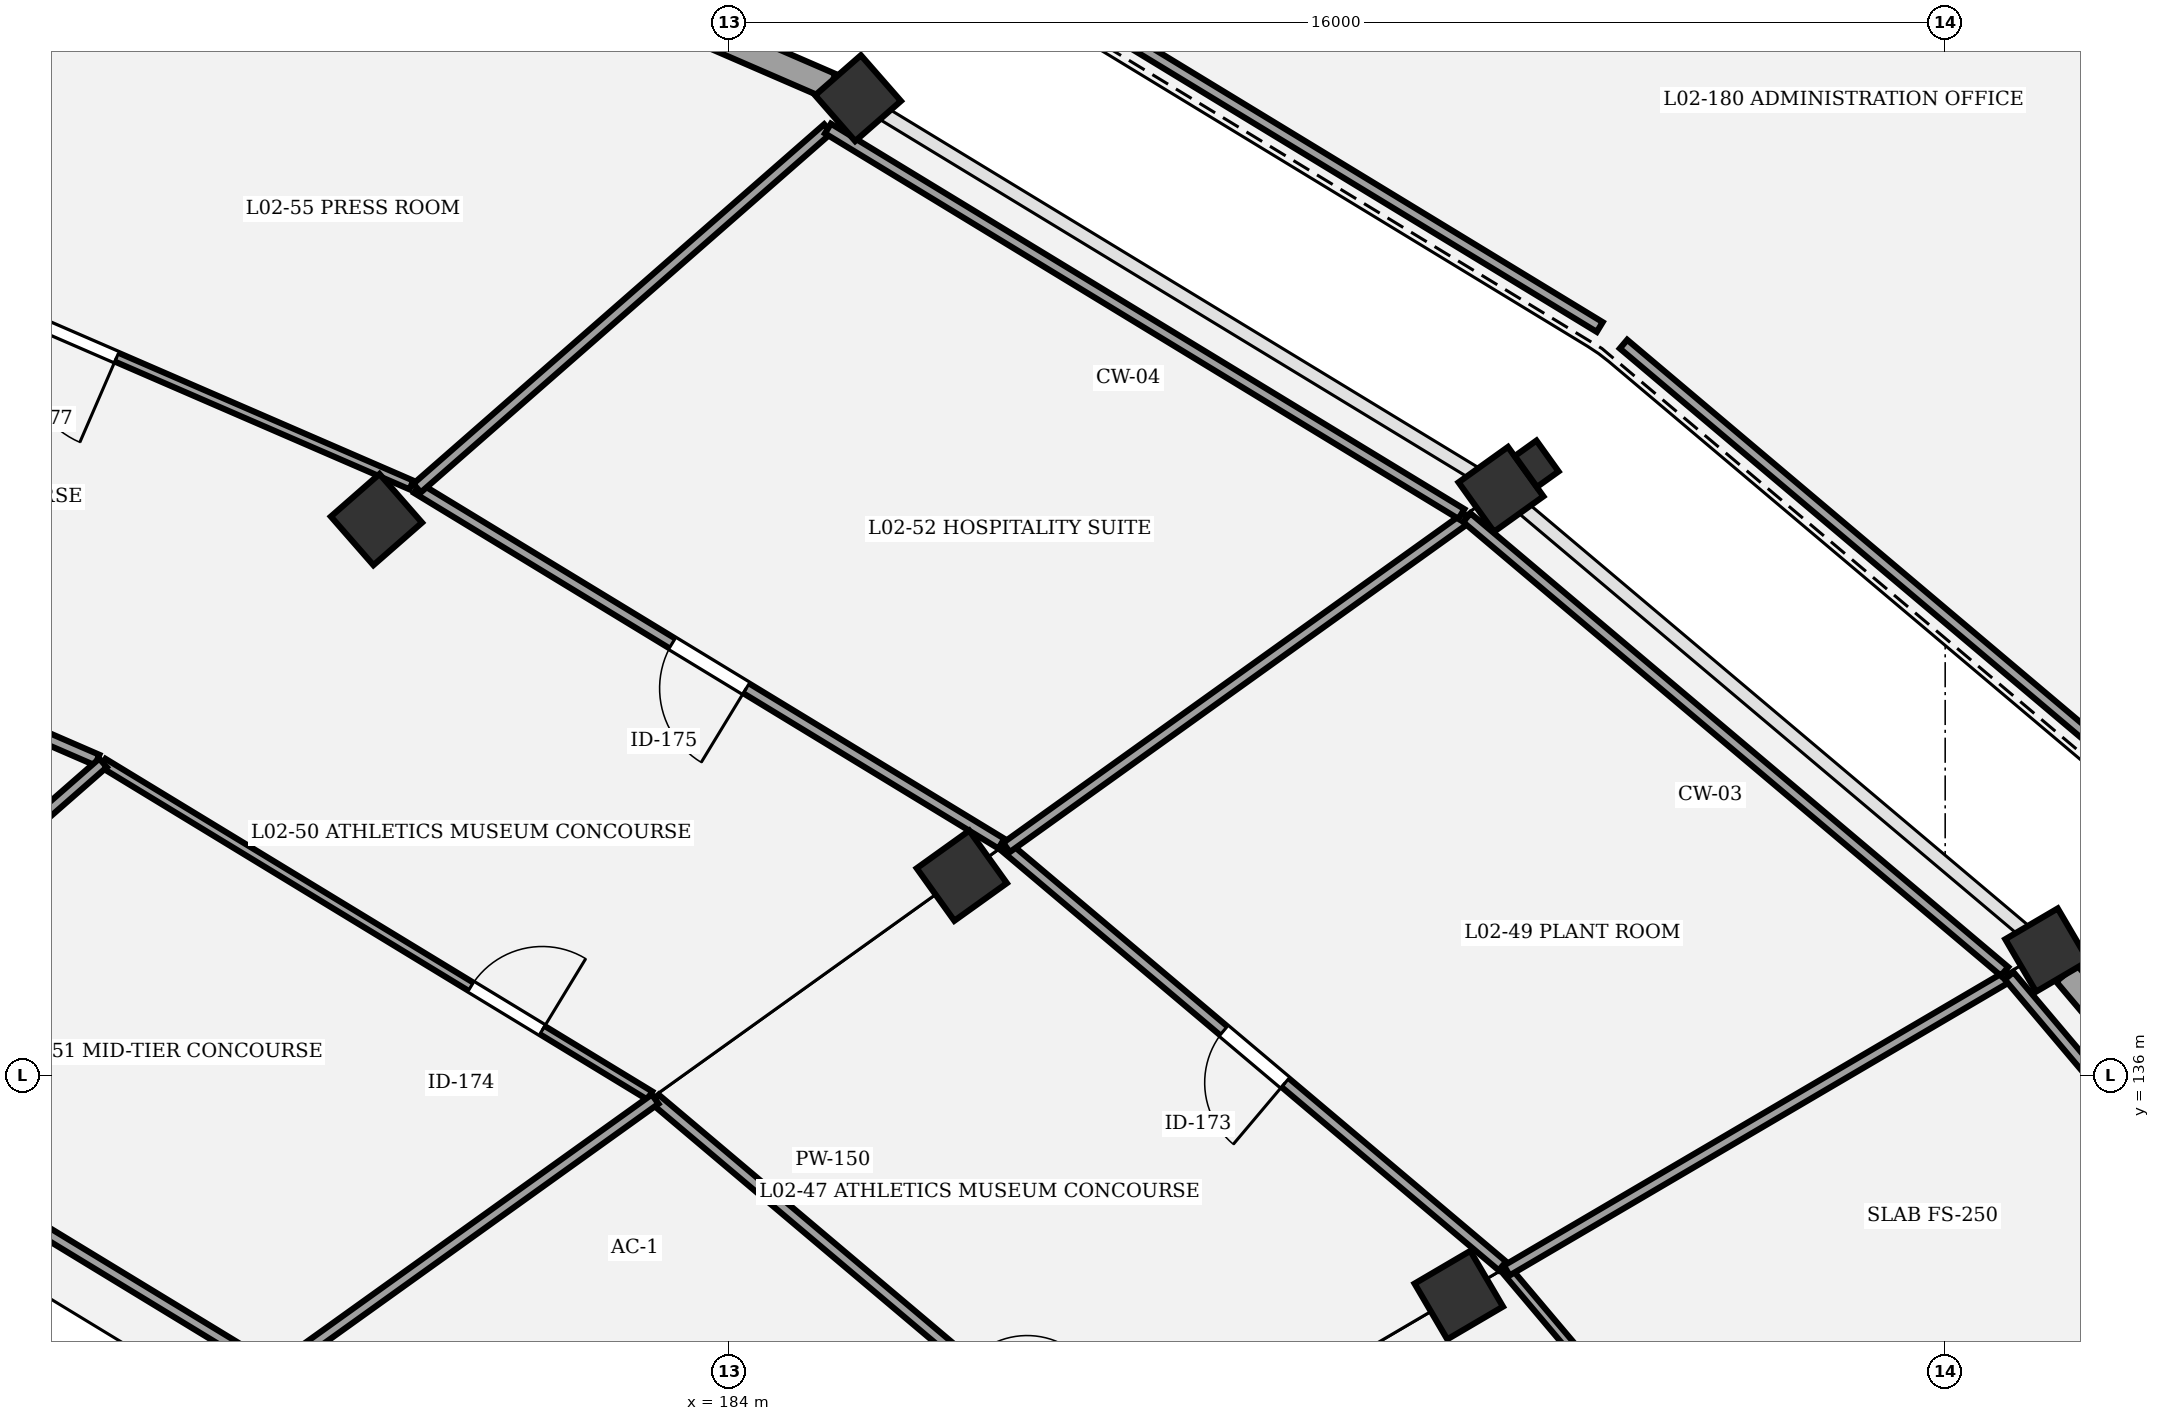
"""IFC4 building model, lengths in metres.
Left out: names, types, materials, properties, quantities, classifications, styles, units other than length and angle.
Written with IfcOpenShell. Run it as: python <this file> out.ifc"""

import sys

from ifc_helpers import new_model, si_unit, direction, frame, frame_2d, origin, origin_2d, place, context, subcontext, project, spatial, rectangle, extrude, element, fill, save


model = new_model("IFC4")
c1 = context("Model", 3, precision=1e-05, world=origin(), true_north=direction((0.0, 1.0)))
c2 = subcontext(c1, "Body", "Model", "MODEL_VIEW")
j1 = project(units=[si_unit("LENGTHUNIT", "METRE"), si_unit("PLANEANGLEUNIT", "RADIAN")], contexts=[c1])
p1 = place(None, origin())
s1 = spatial("IfcSite", under=j1, at=p1, CompositionType="ELEMENT")
p2 = place(p1, origin())
s2 = spatial("IfcBuilding", under=s1, at=p2, CompositionType="ELEMENT")
p3 = place(p2, frame((0.0, 0.0, 10.2)))
s3 = spatial("IfcBuildingStorey", under=s2, at=p3, CompositionType="ELEMENT", Elevation=10.2)
p4 = place(p3, frame((193.6, 133.114, 0.0), z_axis=(0.0, 0.0, 1.0), x_axis=(0.862513669207, 0.506033764121, 0.0)))
e1 = element("IfcColumn", 1, at=p4, inside=s3, PredefinedType="COLUMN", context=c2, shape_type="SweptSolid", body=[
    extrude(rectangle(XDim=0.85, YDim=0.85, at=origin_2d()), origin(), (0.0, 0.0, 1.0), 4.5),
])
p5 = place(p3, frame((201.338, 137.654, 0.0), z_axis=(0.0, 0.0, 1.0), x_axis=(0.862513669207, 0.506033764121, 0.0)))
e2 = element("IfcColumn", 2, at=p5, inside=s3, PredefinedType="COLUMN", context=c2, shape_type="SweptSolid", body=[
    extrude(rectangle(XDim=0.8, YDim=0.8, at=origin_2d()), origin(), (0.0, 0.0, 1.0), 4.5),
])
p6 = place(p3, frame((187.061, 138.632, 0.0), z_axis=(0.0, 0.0, 1.0), x_axis=(0.812897512265, 0.582406760395, 0.0)))
e3 = element("IfcColumn", 3, at=p6, inside=s3, PredefinedType="COLUMN", context=c2, shape_type="SweptSolid", body=[
    extrude(rectangle(XDim=0.85, YDim=0.85, at=origin_2d()), origin(), (0.0, 0.0, 1.0), 4.5),
])
p7 = place(p3, frame((194.156, 143.715, 0.0), z_axis=(0.0, 0.0, 1.0), x_axis=(0.812897512265, 0.582406760395, 0.0)))
e4 = element("IfcColumn", 4, at=p7, inside=s3, PredefinedType="COLUMN", context=c2, shape_type="SweptSolid", body=[
    extrude(rectangle(XDim=0.8, YDim=0.8, at=origin_2d()), origin(), (0.0, 0.0, 1.0), 4.5),
])
p8 = place(p3, frame((194.625, 144.051, 0.0), z_axis=(0.0, 0.0, 1.0), x_axis=(-0.582406760395, 0.812897512265, 0.0)))
e5 = element("IfcColumn", 5, at=p8, inside=s3, PredefinedType="PILASTER", context=c2, shape_type="SweptSolid", body=[
    extrude(rectangle(XDim=0.5, YDim=0.35, at=origin_2d()), origin(), (0.0, 0.0, 1.0), 4.5),
])
p9 = place(p3, frame((179.36, 143.317, 0.0), z_axis=(0.0, 0.0, 1.0), x_axis=(0.752529860433, 0.658558128912, 0.0)))
e6 = element("IfcColumn", 6, at=p9, inside=s3, PredefinedType="COLUMN", context=c2, shape_type="SweptSolid", body=[
    extrude(rectangle(XDim=0.85, YDim=0.85, at=origin_2d()), origin(), (0.0, 0.0, 1.0), 4.5),
])
p10 = place(p3, frame((185.696, 148.861, 0.0), z_axis=(0.0, 0.0, 1.0), x_axis=(0.752529860433, 0.658558128912, 0.0)))
e7 = element("IfcColumn", 7, at=p10, inside=s3, PredefinedType="COLUMN", context=c2, shape_type="SweptSolid", body=[
    extrude(rectangle(XDim=0.8, YDim=0.8, at=origin_2d()), origin(), (0.0, 0.0, 1.0), 4.5),
])
p11 = place(p3, frame((206.986, 130.966, 0.0), z_axis=(0.0, 0.0, 1.0), x_axis=(-0.64515466323, 0.764052001184, 0.0)))
e8 = element("IfcWall", 8, at=p11, inside=s3, PredefinedType="STANDARD", context=c2, shape_type="SweptSolid", body=[
    extrude(rectangle(XDim=8.355, YDim=0.35, at=frame_2d((4.178, 0.0))), origin(), (0.0, 0.0, 1.0), 3.42),
])
p12 = place(p11, frame((2.918, 0.0, 0.9)))
e9 = element("IfcOpeningElement", 9, at=p12, cuts=e8, PredefinedType="OPENING", context=c2, shape_type="SweptSolid", body=[
    extrude(rectangle(XDim=2.52, YDim=1.75, at=frame_2d((1.26, 0.875))), frame((0.0, 0.185, 0.0), z_axis=(0.0, -1.0, 0.0), x_axis=(1.0, 0.0, 0.0)), (0.0, 0.0, 1.0), 0.37),
])
p13 = place(p3, frame((176.303, 152.933, 0.0), z_axis=(0.0, 0.0, 1.0), x_axis=(0.917498288986, -0.397739726088, 0.0)))
e10 = element("IfcWall", 10, at=p13, inside=s3, PredefinedType="STANDARD", context=c2, shape_type="SweptSolid", body=[
    extrude(rectangle(XDim=9.84, YDim=0.35, at=frame_2d((4.92, 0.0))), origin(), (0.0, 0.0, 1.0), 3.42),
])
p14 = place(p13, frame((4.02, 0.0, 0.0)))
e11 = element("IfcOpeningElement", 11, at=p14, cuts=e10, PredefinedType="OPENING", context=c2, shape_type="SweptSolid", body=[
    extrude(rectangle(XDim=1.8, YDim=2.4, at=frame_2d((0.9, 1.2))), frame((0.0, 0.185, 0.0), z_axis=(0.0, -1.0, 0.0), x_axis=(1.0, 0.0, 0.0)), (0.0, 0.0, 1.0), 0.37),
])
p15 = place(p3, frame((199.595, 127.086, 0.0), z_axis=(0.0, 0.0, 1.0), x_axis=(-0.64516519871, 0.76404310505, 0.0)))
e12 = element("IfcWall", 12, at=p15, inside=s3, PredefinedType="PARTITIONING", context=c2, shape_type="SweptSolid", body=[
    extrude(rectangle(XDim=8.313, YDim=0.125, at=frame_2d((4.157, 0.0))), origin(), (0.0, 0.0, 1.0), 3.25),
])
p16 = place(p15, frame((3.667, 0.0, 0.0)))
e13 = element("IfcOpeningElement", 13, at=p16, cuts=e12, PredefinedType="OPENING", context=c2, shape_type="SweptSolid", body=[
    extrude(rectangle(XDim=0.98, YDim=2.3, at=frame_2d((0.49, 1.15))), frame((0.0, 0.073, 0.0), z_axis=(0.0, -1.0, 0.0), x_axis=(1.0, 0.0, 0.0)), (0.0, 0.0, 1.0), 0.145),
])
p17 = place(p3, frame((183.027, 135.692, 0.0), z_axis=(0.0, 0.0, 1.0), x_axis=(0.764249122867, -0.644921141068, 0.0)))
e14 = element("IfcWall", 14, at=p17, inside=s3, PredefinedType="PARTITIONING", context=c2, shape_type="SweptSolid", body=[
    extrude(rectangle(XDim=7.99, YDim=0.15, at=frame_2d((3.995, 0.0))), origin(), (0.0, 0.0, 1.0), 3.25),
])
p18 = place(p17, frame((5.384, 0.0, 0.0)))
e15 = element("IfcOpeningElement", 15, at=p18, cuts=e14, PredefinedType="OPENING", context=c2, shape_type="SweptSolid", body=[
    extrude(rectangle(XDim=1.02, YDim=2.3, at=frame_2d((0.51, 1.15))), frame((0.0, 0.085, 0.0), z_axis=(0.0, -1.0, 0.0), x_axis=(1.0, 0.0, 0.0)), (0.0, 0.0, 1.0), 0.17),
])
p19 = place(p3, frame((194.175, 133.497, 0.0), z_axis=(0.0, 0.0, 1.0), x_axis=(-0.764257572309, 0.644911128117, 0.0)))
e16 = element("IfcWall", 16, at=p19, inside=s3, PredefinedType="PARTITIONING", context=c2, shape_type="SweptSolid", body=[
    extrude(rectangle(XDim=8.539, YDim=0.15, at=frame_2d((4.269, 0.0))), origin(), (0.0, 0.0, 1.0), 3.25),
])
p20 = place(p19, frame((3.739, 0.0, 0.0)))
e17 = element("IfcOpeningElement", 17, at=p20, cuts=e16, PredefinedType="OPENING", context=c2, shape_type="SweptSolid", body=[
    extrude(rectangle(XDim=1.06, YDim=2.3, at=frame_2d((0.53, 1.15))), frame((0.0, 0.085, 0.0), z_axis=(0.0, -1.0, 0.0), x_axis=(1.0, 0.0, 0.0)), (0.0, 0.0, 1.0), 0.17),
])
p21 = place(p3, frame((175.763, 140.116, 0.0), z_axis=(0.0, 0.0, 1.0), x_axis=(0.854330104408, -0.519730769439, 0.0)))
e18 = element("IfcWall", 18, at=p21, inside=s3, PredefinedType="PARTITIONING", context=c2, shape_type="SweptSolid", body=[
    extrude(rectangle(XDim=8.42, YDim=0.125, at=frame_2d((4.21, 0.0))), origin(), (0.0, 0.0, 1.0), 3.25),
])
p22 = place(p21, frame((5.664, 0.0, 0.0)))
e19 = element("IfcOpeningElement", 19, at=p22, cuts=e18, PredefinedType="OPENING", context=c2, shape_type="SweptSolid", body=[
    extrude(rectangle(XDim=1.1, YDim=2.3, at=frame_2d((0.55, 1.15))), frame((0.0, 0.073, 0.0), z_axis=(0.0, -1.0, 0.0), x_axis=(1.0, 0.0, 0.0)), (0.0, 0.0, 1.0), 0.145),
])
p23 = place(p3, frame((187.582, 139.054, 0.0), z_axis=(0.0, 0.0, 1.0), x_axis=(-0.854321649351, 0.519744667554, 0.0)))
e20 = element("IfcWall", 20, at=p23, inside=s3, PredefinedType="PARTITIONING", context=c2, shape_type="SweptSolid", body=[
    extrude(rectangle(XDim=8.999, YDim=0.15, at=frame_2d((4.499, 0.0))), origin(), (0.0, 0.0, 1.0), 3.25),
])
p24 = place(p23, frame((3.929, 0.0, 0.0)))
e21 = element("IfcOpeningElement", 21, at=p24, cuts=e20, PredefinedType="OPENING", context=c2, shape_type="SweptSolid", body=[
    extrude(rectangle(XDim=1.14, YDim=2.3, at=frame_2d((0.57, 1.15))), frame((0.0, 0.085, 0.0), z_axis=(0.0, -1.0, 0.0), x_axis=(1.0, 0.0, 0.0)), (0.0, 0.0, 1.0), 0.17),
])
p25 = place(p3, frame((167.382, 143.753, 0.0), z_axis=(0.0, 0.0, 1.0), x_axis=(0.917494590455, -0.397748257677, 0.0)))
e22 = element("IfcWall", 22, at=p25, inside=s3, PredefinedType="PARTITIONING", context=c2, shape_type="SweptSolid", body=[
    extrude(rectangle(XDim=9.049, YDim=0.15, at=frame_2d((4.525, 0.0))), origin(), (0.0, 0.0, 1.0), 3.25),
])
p26 = place(p25, frame((6.104, 0.0, 0.0)))
e23 = element("IfcOpeningElement", 23, at=p26, cuts=e22, PredefinedType="OPENING", context=c2, shape_type="SweptSolid", body=[
    extrude(rectangle(XDim=1.18, YDim=2.3, at=frame_2d((0.59, 1.15))), frame((0.0, 0.085, 0.0), z_axis=(0.0, -1.0, 0.0), x_axis=(1.0, 0.0, 0.0)), (0.0, 0.0, 1.0), 0.17),
])
p27 = place(p3, frame((179.82, 143.772, 0.0), z_axis=(0.0, 0.0, 1.0), x_axis=(-0.917508957037, 0.39771511633, 0.0)))
e24 = element("IfcWall", 24, at=p27, inside=s3, PredefinedType="PARTITIONING", context=c2, shape_type="SweptSolid", body=[
    extrude(rectangle(XDim=9.671, YDim=0.125, at=frame_2d((4.836, 0.0))), origin(), (0.0, 0.0, 1.0), 3.25),
])
p28 = place(p27, frame((4.226, 0.0, 0.0)))
e25 = element("IfcOpeningElement", 25, at=p28, cuts=e24, PredefinedType="OPENING", context=c2, shape_type="SweptSolid", body=[
    extrude(rectangle(XDim=1.22, YDim=2.3, at=frame_2d((0.61, 1.15))), frame((0.0, 0.073, 0.0), z_axis=(0.0, -1.0, 0.0), x_axis=(1.0, 0.0, 0.0)), (0.0, 0.0, 1.0), 0.145),
])
p29 = place(p3, frame((194.232, 133.438, 0.0), z_axis=(0.0, 0.0, 1.0), x_axis=(0.862520085009, 0.506022828492, 0.0)))
e26 = element("IfcWall", 26, at=p29, inside=s3, PredefinedType="PARTITIONING", context=c2, shape_type="SweptSolid", body=[
    extrude(rectangle(XDim=7.663, YDim=0.15, at=frame_2d((3.831, 0.0))), origin(), (0.0, 0.0, 1.0), 3.25),
])
p30 = place(p3, frame((200.841, 137.315, 0.0), z_axis=(0.0, 0.0, 1.0), x_axis=(0.645166061073, -0.764042376861, 0.0)))
e27 = element("IfcWall", 27, at=p30, inside=s3, PredefinedType="PARTITIONING", context=c2, shape_type="SweptSolid", body=[
    extrude(rectangle(XDim=9.014, YDim=0.15, at=frame_2d((4.507, 0.0))), origin(), (0.0, 0.0, 1.0), 3.25),
])
p31 = place(p3, frame((178.016, 132.102, 0.0), z_axis=(0.0, 0.0, 1.0), x_axis=(0.812884316969, 0.582425177362, 0.0)))
e28 = element("IfcWall", 28, at=p31, inside=s3, PredefinedType="PARTITIONING", context=c2, shape_type="SweptSolid", body=[
    extrude(rectangle(XDim=6.165, YDim=0.15, at=frame_2d((3.082, 0.0))), origin(), (0.0, 0.0, 1.0), 3.25),
])
p32 = place(p3, frame((187.649, 139.004, 0.0), z_axis=(0.0, 0.0, 1.0), x_axis=(0.812884613266, 0.582424763824, 0.0)))
e29 = element("IfcWall", 29, at=p32, inside=s3, PredefinedType="PARTITIONING", context=c2, shape_type="SweptSolid", body=[
    extrude(rectangle(XDim=7.45, YDim=0.15, at=frame_2d((3.725, 0.0))), origin(), (0.0, 0.0, 1.0), 3.25),
])
p33 = place(p3, frame((193.706, 143.343, 0.0), z_axis=(0.0, 0.0, 1.0), x_axis=(0.764252893528, -0.644916672706, 0.0)))
e30 = element("IfcWall", 30, at=p33, inside=s3, PredefinedType="PARTITIONING", context=c2, shape_type="SweptSolid", body=[
    extrude(rectangle(XDim=9.257, YDim=0.15, at=frame_2d((4.629, 0.0))), origin(), (0.0, 0.0, 1.0), 3.25),
])
p34 = place(p3, frame((177.949, 132.152, 0.0), z_axis=(0.0, 0.0, 1.0), x_axis=(-0.854328586702, 0.519733264226, 0.0)))
e31 = element("IfcWall", 31, at=p34, inside=s3, PredefinedType="PARTITIONING", context=c2, shape_type="SweptSolid", body=[
    extrude(rectangle(XDim=7.793, YDim=0.15, at=frame_2d((3.897, 0.0))), origin(), (0.0, 0.0, 1.0), 3.25),
])
p35 = place(p3, frame((171.291, 136.203, 0.0), z_axis=(0.0, 0.0, 1.0), x_axis=(0.752543608061, 0.658542419261, 0.0)))
e32 = element("IfcWall", 32, at=p35, inside=s3, PredefinedType="PARTITIONING", context=c2, shape_type="SweptSolid", body=[
    extrude(rectangle(XDim=5.942, YDim=0.15, at=frame_2d((2.971, 0.0))), origin(), (0.0, 0.0, 1.0), 3.25),
])
p36 = place(p3, frame((179.895, 143.731, 0.0), z_axis=(0.0, 0.0, 1.0), x_axis=(0.752564061831, 0.658519045162, 0.0)))
e33 = element("IfcWall", 33, at=p36, inside=s3, PredefinedType="PARTITIONING", context=c2, shape_type="SweptSolid", body=[
    extrude(rectangle(XDim=7.183, YDim=0.15, at=frame_2d((3.592, 0.0))), origin(), (0.0, 0.0, 1.0), 3.25),
])
p37 = place(p3, frame((185.3, 148.461, 0.0), z_axis=(0.0, 0.0, 1.0), x_axis=(0.854323689683, -0.519741313777, 0.0)))
e34 = element("IfcWall", 34, at=p37, inside=s3, PredefinedType="PARTITIONING", context=c2, shape_type="SweptSolid", body=[
    extrude(rectangle(XDim=9.756, YDim=0.15, at=frame_2d((4.878, 0.0))), origin(), (0.0, 0.0, 1.0), 3.25),
])
p38 = place(p3, frame((172.286, 149.072, 0.0), z_axis=(0.0, 0.0, 1.0), x_axis=(0.67785928919, 0.735191664846, 0.0)))
e35 = element("IfcWall", 35, at=p38, inside=s3, PredefinedType="PARTITIONING", context=c2, shape_type="SweptSolid", body=[
    extrude(rectangle(XDim=4.893, YDim=0.15, at=frame_2d((2.446, 0.0))), origin(), (0.0, 0.0, 1.0), 3.25),
])
p39 = place(p3, frame((195.455, 145.85, 0.0), z_axis=(0.0, 0.0, 1.0), x_axis=(-0.854333268174, 0.519725568826, 0.0)))
e36 = element("IfcWall", 36, at=p39, inside=s3, PredefinedType="PARTITIONING", context=c2, shape_type="SweptSolid", body=[
    extrude(rectangle(XDim=9.902, YDim=0.15, at=frame_2d((4.951, 0.0))), origin(), (0.0, 0.0, 1.0), 3.25),
])
p40 = place(p3, frame((202.9, 139.607, 0.0), z_axis=(0.0, 0.0, 1.0), x_axis=(-0.764245949545, 0.644924901523, 0.0)))
e37 = element("IfcWall", 37, at=p40, inside=s3, PredefinedType="PARTITIONING", context=c2, shape_type="SweptSolid", body=[
    extrude(rectangle(XDim=9.332, YDim=0.15, at=frame_2d((4.666, 0.0))), origin(), (0.0, 0.0, 1.0), 3.25),
])
p41 = place(p20, origin())
e38 = element("IfcDoor", 38, at=p41, inside=s3, OperationType="SINGLE_SWING_LEFT", PredefinedType="DOOR", context=c2, shape_type="SweptSolid", body=[
    extrude(rectangle(XDim=1.06, YDim=2.3, at=frame_2d((0.53, 1.15))), frame((0.0, 0.025, 0.0), z_axis=(0.0, -1.0, 0.0), x_axis=(1.0, 0.0, 0.0)), (0.0, 0.0, 1.0), 0.05),
])
fill(e17, e38)
p42 = place(p22, origin())
e39 = element("IfcDoor", 39, at=p42, inside=s3, OperationType="SINGLE_SWING_RIGHT", PredefinedType="DOOR", context=c2, shape_type="SweptSolid", body=[
    extrude(rectangle(XDim=1.1, YDim=2.3, at=frame_2d((0.55, 1.15))), frame((0.0, 0.025, 0.0), z_axis=(0.0, -1.0, 0.0), x_axis=(1.0, 0.0, 0.0)), (0.0, 0.0, 1.0), 0.05),
])
fill(e19, e39)
p43 = place(p24, origin())
e40 = element("IfcDoor", 40, at=p43, inside=s3, OperationType="SINGLE_SWING_LEFT", PredefinedType="DOOR", context=c2, shape_type="SweptSolid", body=[
    extrude(rectangle(XDim=1.14, YDim=2.3, at=frame_2d((0.57, 1.15))), frame((0.0, 0.025, 0.0), z_axis=(0.0, -1.0, 0.0), x_axis=(1.0, 0.0, 0.0)), (0.0, 0.0, 1.0), 0.05),
])
fill(e21, e40)
p44 = place(p28, origin())
e41 = element("IfcDoor", 41, at=p44, inside=s3, OperationType="SINGLE_SWING_LEFT", PredefinedType="DOOR", context=c2, shape_type="SweptSolid", body=[
    extrude(rectangle(XDim=1.22, YDim=2.3, at=frame_2d((0.61, 1.15))), frame((0.0, 0.025, 0.0), z_axis=(0.0, -1.0, 0.0), x_axis=(1.0, 0.0, 0.0)), (0.0, 0.0, 1.0), 0.05),
])
fill(e25, e41)
save(model, sys.argv[1])
